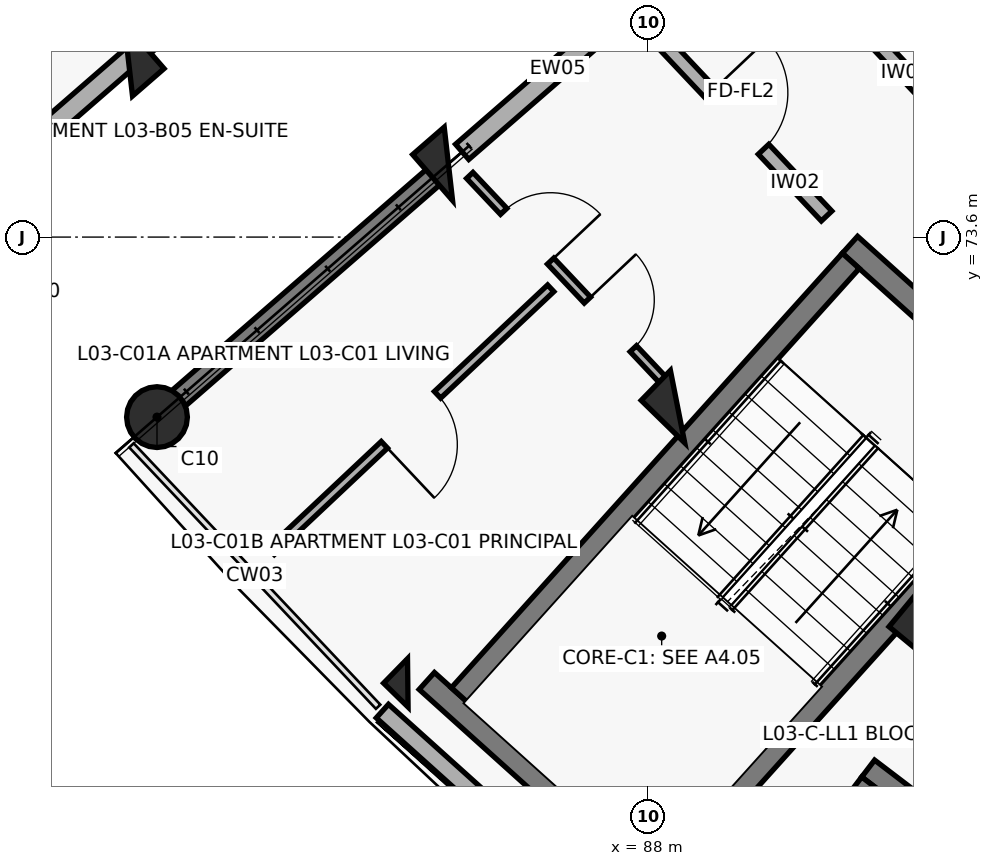
"""IFC4 building model, lengths in metres.
Left out: names, types, materials, properties, quantities, classifications, styles, units other than length and angle.
Written with IfcOpenShell. Run it as: python <this file> out.ifc"""

import sys

from ifc_helpers import new_model, si_unit, direction, frame, frame_2d, origin, origin_2d, place, context, subcontext, project, spatial, rectangle, circle, extrude, element, fill, save


model = new_model("IFC4")
c1 = context("Model", 3, precision=1e-05, world=origin(), true_north=direction((0.0, 1.0)))
c2 = subcontext(c1, "Body", "Model", "MODEL_VIEW")
j1 = project(units=[si_unit("LENGTHUNIT", "METRE"), si_unit("PLANEANGLEUNIT", "RADIAN")], contexts=[c1])
p1 = place(None, origin())
s1 = spatial("IfcSite", under=j1, at=p1, CompositionType="ELEMENT")
p2 = place(p1, origin())
s2 = spatial("IfcBuilding", under=s1, at=p2, CompositionType="ELEMENT")
p3 = place(p2, frame((0.0, 0.0, 11.2)))
s3 = spatial("IfcBuildingStorey", under=s2, at=p3, CompositionType="ELEMENT", Elevation=11.2)
for number, where, z_axis, x_axis in (
    (1, (81.166, 75.938, 0.0), (0.0, 0.0, 1.0), (0.755, 0.656, 0.0)),
    (2, (85.377, 74.564, 0.0), (0.0, 0.0, 1.0), (-0.755, -0.656, 0.0)),
):
    element("IfcColumn", number, at=place(p3, frame(where, z_axis=z_axis, x_axis=x_axis)), inside=s3, PredefinedType="COLUMN", context=c2, shape_type="SweptSolid", body=[
        extrude(rectangle(XDim=0.55, YDim=0.8, at=origin_2d()), origin(), (0.0, 0.0, 1.0), 3.1),
    ])
p4 = place(p3, frame((81.543, 71.231, 0.0), z_axis=(0.0, 0.0, 1.0), x_axis=(-0.754709580223, -0.656059028991, 0.0)))
e3 = element("IfcColumn", 3, at=p4, inside=s3, PredefinedType="COLUMN", context=c2, shape_type="SweptSolid", body=[
    extrude(circle(Radius=0.4, at=origin_2d()), origin(), (0.0, 0.0, 1.0), 3.1),
])
p5 = place(p3, frame((88.392, 71.369, 0.0), z_axis=(0.0, 0.0, 1.0), x_axis=(-0.698665066769, -0.715448897181, 0.0)))
e4 = element("IfcColumn", 4, at=p5, inside=s3, PredefinedType="COLUMN", context=c2, shape_type="SweptSolid", body=[
    extrude(rectangle(XDim=0.55, YDim=0.8, at=origin_2d()), origin(), (0.0, 0.0, 1.0), 3.1),
])
p6 = place(p3, frame((84.843, 67.734, 0.0), z_axis=(0.0, 0.0, 1.0), x_axis=(-0.698665066769, -0.715448897181, 0.0)))
e5 = element("IfcColumn", 5, at=p6, inside=s3, PredefinedType="COLUMN", context=c2, shape_type="SweptSolid", body=[
    extrude(rectangle(XDim=0.45, YDim=0.45, at=origin_2d()), origin(), (0.0, 0.0, 1.0), 3.1),
])
p7 = place(p3, frame((91.658, 68.43, 0.0), z_axis=(0.0, 0.0, 1.0), x_axis=(-0.637961754089, -0.770068049148, 0.0)))
e6 = element("IfcColumn", 6, at=p7, inside=s3, PredefinedType="COLUMN", context=c2, shape_type="SweptSolid", body=[
    extrude(rectangle(XDim=0.55, YDim=0.8, at=origin_2d()), origin(), (0.0, 0.0, 1.0), 3.1),
])
p8 = place(p3, frame((85.241, 74.446, 0.0), z_axis=(0.0, 0.0, 1.0), x_axis=(-0.754703505217, -0.65606601742, 0.0)))
e7 = element("IfcWall", 7, at=p8, inside=s3, PredefinedType="SHEAR", context=c2, shape_type="SweptSolid", body=[
    extrude(rectangle(XDim=4.72, YDim=0.27, at=frame_2d((2.36, 0.0))), origin(), (0.0, 0.0, 1.0), 2.86),
])
p9 = place(p3, frame((79.234, 74.259, 0.0), z_axis=(0.0, 0.0, 1.0), x_axis=(0.754717680958, 0.656049710044, 0.0)))
e8 = element("IfcWall", 8, at=p9, inside=s3, PredefinedType="SOLIDWALL", context=c2, shape_type="SweptSolid", body=[
    extrude(rectangle(XDim=8.2, YDim=0.265, at=frame_2d((4.1, 0.0))), origin(), (0.0, 0.0, 1.0), 2.08),
])
p10 = place(p9, frame((3.59, 0.0, 0.75)))
e9 = element("IfcOpeningElement", 9, at=p10, cuts=e8, PredefinedType="OPENING", context=c2, shape_type="SweptSolid", body=[
    extrude(rectangle(XDim=1.35, YDim=1.35, at=frame_2d((0.675, 0.675))), frame((0.0, 0.142, 0.0), z_axis=(0.0, -1.0, 0.0), x_axis=(1.0, 0.0, 0.0)), (0.0, 0.0, 1.0), 0.285),
])
p11 = place(p3, frame((84.508, 67.363, 0.0), z_axis=(0.0, 0.0, 1.0), x_axis=(0.743387539862, -0.668860946369, 0.0)))
e10 = element("IfcWall", 10, at=p11, inside=s3, PredefinedType="SOLIDWALL", context=c2, shape_type="SweptSolid", body=[
    extrude(rectangle(XDim=4.809, YDim=0.24, at=frame_2d((2.405, 0.0))), origin(), (0.0, 0.0, 1.0), 2.25),
])
p12 = place(p3, frame((91.746, 80.101, 0.0), z_axis=(0.0, 0.0, 1.0), x_axis=(-0.754704866158, -0.656064451862, 0.0)))
e11 = element("IfcWall", 11, at=p12, inside=s3, PredefinedType="SOLIDWALL", context=c2, shape_type="SweptSolid", body=[
    extrude(rectangle(XDim=8.2, YDim=0.265, at=frame_2d((4.1, 0.0))), origin(), (0.0, 0.0, 1.0), 2.08),
])
p13 = place(p12, frame((3.59, 0.0, 0.75)))
e12 = element("IfcOpeningElement", 12, at=p13, cuts=e11, PredefinedType="OPENING", context=c2, shape_type="SweptSolid", body=[
    extrude(rectangle(XDim=1.35, YDim=1.35, at=frame_2d((0.675, 0.675))), frame((0.0, 0.142, 0.0), z_axis=(0.0, -1.0, 0.0), x_axis=(1.0, 0.0, 0.0)), (0.0, 0.0, 1.0), 0.285),
])
p14 = place(p3, frame((90.66, 73.499, 0.0), z_axis=(0.0, 0.0, 1.0), x_axis=(0.743375696158, -0.668874109501, 0.0)))
e13 = element("IfcWall", 13, at=p14, inside=s3, PredefinedType="SHEAR", context=c2, shape_type="SweptSolid", body=[
    extrude(rectangle(XDim=3.87, YDim=0.3, at=frame_2d((1.935, 0.0))), origin(), (0.0, 0.0, 1.0), 3.1),
])
p15 = place(p14, frame((1.435, 0.0, 0.0)))
e14 = element("IfcOpeningElement", 14, at=p15, cuts=e13, PredefinedType="OPENING", context=c2, shape_type="SweptSolid", body=[
    extrude(rectangle(XDim=1.0, YDim=2.15, at=frame_2d((0.5, 1.075))), frame((0.0, 0.16, 0.0), z_axis=(0.0, -1.0, 0.0), x_axis=(1.0, 0.0, 0.0)), (0.0, 0.0, 1.0), 0.32),
])
p16 = place(p3, frame((85.093, 67.76, 0.0), z_axis=(0.0, 0.0, 1.0), x_axis=(0.743372896184, -0.668877221333, 0.0)))
e15 = element("IfcWall", 15, at=p16, inside=s3, PredefinedType="SHEAR", context=c2, shape_type="SweptSolid", body=[
    extrude(rectangle(XDim=4.47, YDim=0.3, at=frame_2d((2.235, 0.0))), origin(), (0.0, 0.0, 1.0), 3.1),
])
p17 = place(p3, frame((90.671, 73.287, 0.0), z_axis=(0.0, 0.0, 1.0), x_axis=(-0.668885797871, -0.743365179038, 0.0)))
e16 = element("IfcWall", 16, at=p17, inside=s3, PredefinedType="SHEAR", context=c2, shape_type="SweptSolid", body=[
    extrude(rectangle(XDim=7.69, YDim=0.3, at=frame_2d((3.845, 0.0))), origin(), (0.0, 0.0, 1.0), 3.1),
])
p18 = place(p3, frame((93.325, 70.899, 0.0), z_axis=(0.0, 0.0, 1.0), x_axis=(-0.668868253964, -0.743380964808, 0.0)))
e17 = element("IfcWall", 17, at=p18, inside=s3, PredefinedType="SHEAR", context=c2, shape_type="SweptSolid", body=[
    extrude(rectangle(XDim=7.69, YDim=0.3, at=frame_2d((3.845, 0.0))), origin(), (0.0, 0.0, 1.0), 3.1),
])
p19 = place(p3, frame((90.899, 66.607, 0.0), z_axis=(0.0, 0.0, 1.0), x_axis=(0.795439986025, -0.606032365994, 0.0)))
e18 = element("IfcWall", 18, at=p19, inside=s3, PredefinedType="SHEAR", context=c2, shape_type="SweptSolid", body=[
    extrude(rectangle(XDim=3.39, YDim=0.28, at=frame_2d((1.695, 0.0))), origin(), (0.0, 0.0, 1.0), 3.1),
])
p20 = place(p19, frame((1.095, 0.0, 0.0)))
e19 = element("IfcOpeningElement", 19, at=p20, cuts=e18, PredefinedType="OPENING", context=c2, shape_type="SweptSolid", body=[
    extrude(rectangle(XDim=1.2, YDim=2.15, at=frame_2d((0.6, 1.075))), frame((0.0, 0.15, 0.0), z_axis=(0.0, -1.0, 0.0), x_axis=(1.0, 0.0, 0.0)), (0.0, 0.0, 1.0), 0.3),
])
p21 = place(p3, frame((90.926, 66.411, 0.0), z_axis=(0.0, 0.0, 1.0), x_axis=(-0.605948992168, -0.795503500238, 0.0)))
e20 = element("IfcWall", 20, at=p21, inside=s3, PredefinedType="SHEAR", context=c2, shape_type="SweptSolid", body=[
    extrude(rectangle(XDim=2.03, YDim=0.28, at=frame_2d((1.015, 0.0))), origin(), (0.0, 0.0, 1.0), 3.1),
])
p22 = place(p3, frame((78.163, 75.139, 0.0), z_axis=(0.0, 0.0, 1.0), x_axis=(0.734519733107, 0.678587327967, 0.0)))
e21 = element("IfcWall", 21, at=p22, inside=s3, PredefinedType="PARTITIONING", context=c2, shape_type="SweptSolid", body=[
    extrude(rectangle(XDim=3.3, YDim=0.145, at=frame_2d((1.65, 0.0))), origin(), (0.0, 0.0, 1.0), 2.08),
])
p23 = place(p22, frame((1.21, 0.0, 0.0)))
e22 = element("IfcOpeningElement", 22, at=p23, cuts=e21, PredefinedType="OPENING", context=c2, shape_type="SweptSolid", body=[
    extrude(rectangle(XDim=0.88, YDim=2.1, at=frame_2d((0.44, 1.05))), frame((0.0, 0.083, 0.0), z_axis=(0.0, -1.0, 0.0), x_axis=(1.0, 0.0, 0.0)), (0.0, 0.0, 1.0), 0.165),
])
p24 = place(p3, frame((87.994, 76.376, 0.0), z_axis=(0.0, 0.0, 1.0), x_axis=(0.686310507227, -0.727308660522, 0.0)))
e23 = element("IfcWall", 23, at=p24, inside=s3, PredefinedType="SOLIDWALL", context=c2, shape_type="SweptSolid", body=[
    extrude(rectangle(XDim=3.436, YDim=0.19, at=frame_2d((1.718, 0.0))), origin(), (0.0, 0.0, 1.0), 2.08),
])
p25 = place(p24, frame((1.208, 0.0, 0.0)))
e24 = element("IfcOpeningElement", 24, at=p25, cuts=e23, PredefinedType="OPENING", context=c2, shape_type="SweptSolid", body=[
    extrude(rectangle(XDim=1.02, YDim=2.15, at=frame_2d((0.51, 1.075))), frame((0.0, 0.105, 0.0), z_axis=(0.0, -1.0, 0.0), x_axis=(1.0, 0.0, 0.0)), (0.0, 0.0, 1.0), 0.21),
])
p26 = place(p3, frame((89.541, 77.721, 0.0), z_axis=(0.0, 0.0, 1.0), x_axis=(0.686344941052, -0.727276166179, 0.0)))
e25 = element("IfcWall", 25, at=p26, inside=s3, PredefinedType="SOLIDWALL", context=c2, shape_type="SweptSolid", body=[
    extrude(rectangle(XDim=3.269, YDim=0.19, at=frame_2d((1.634, 0.0))), origin(), (0.0, 0.0, 1.0), 2.08),
])
p27 = place(p26, frame((1.154, 0.0, 0.0)))
e26 = element("IfcOpeningElement", 26, at=p27, cuts=e25, PredefinedType="OPENING", context=c2, shape_type="SweptSolid", body=[
    extrude(rectangle(XDim=0.96, YDim=2.1, at=frame_2d((0.48, 1.05))), frame((0.0, 0.105, 0.0), z_axis=(0.0, -1.0, 0.0), x_axis=(1.0, 0.0, 0.0)), (0.0, 0.0, 1.0), 0.21),
])
p28 = place(p3, frame((85.658, 74.411, 0.0), z_axis=(0.0, 0.0, 1.0), x_axis=(0.686364008772, -0.727258171121, 0.0)))
e27 = element("IfcWall", 27, at=p28, inside=s3, PredefinedType="PARTITIONING", context=c2, shape_type="SweptSolid", body=[
    extrude(rectangle(XDim=3.785, YDim=0.115, at=frame_2d((1.893, 0.0))), origin(), (0.0, 0.0, 1.0), 2.08),
])
p29 = place(p28, frame((0.65, 0.0, 0.0)))
e28 = element("IfcOpeningElement", 28, at=p29, cuts=e27, PredefinedType="OPENING", context=c2, shape_type="SweptSolid", body=[
    extrude(rectangle(XDim=0.9, YDim=2.1, at=frame_2d((0.45, 1.05))), frame((0.0, 0.067, 0.0), z_axis=(0.0, -1.0, 0.0), x_axis=(1.0, 0.0, 0.0)), (0.0, 0.0, 1.0), 0.135),
])
p30 = place(p28, frame((2.255, 0.0, 0.0)))
e29 = element("IfcOpeningElement", 29, at=p30, cuts=e27, PredefinedType="OPENING", context=c2, shape_type="SweptSolid", body=[
    extrude(rectangle(XDim=0.88, YDim=2.1, at=frame_2d((0.44, 1.05))), frame((0.0, 0.067, 0.0), z_axis=(0.0, -1.0, 0.0), x_axis=(1.0, 0.0, 0.0)), (0.0, 0.0, 1.0), 0.135),
])
p31 = place(p3, frame((86.723, 72.926, 0.0), z_axis=(0.0, 0.0, 1.0), x_axis=(-0.72831636485, -0.685241032551, 0.0)))
e30 = element("IfcWall", 30, at=p31, inside=s3, PredefinedType="PARTITIONING", context=c2, shape_type="SweptSolid", body=[
    extrude(rectangle(XDim=5.05, YDim=0.12, at=frame_2d((2.525, 0.0))), origin(), (0.0, 0.0, 1.0), 2.08),
])
p32 = place(p31, frame((2.045, 0.0, 0.0)))
e31 = element("IfcOpeningElement", 31, at=p32, cuts=e30, PredefinedType="OPENING", context=c2, shape_type="SweptSolid", body=[
    extrude(rectangle(XDim=0.96, YDim=2.1, at=frame_2d((0.48, 1.05))), frame((0.0, 0.07, 0.0), z_axis=(0.0, -1.0, 0.0), x_axis=(1.0, 0.0, 0.0)), (0.0, 0.0, 1.0), 0.14),
])
p33 = place(p25, origin())
e32 = element("IfcDoor", 32, at=p33, inside=s3, OperationType="SINGLE_SWING_LEFT", PredefinedType="DOOR", context=c2, shape_type="SweptSolid", body=[
    extrude(rectangle(XDim=1.02, YDim=2.15, at=frame_2d((0.51, 1.075))), frame((0.0, 0.025, 0.0), z_axis=(0.0, -1.0, 0.0), x_axis=(1.0, 0.0, 0.0)), (0.0, 0.0, 1.0), 0.05),
])
fill(e24, e32)
p34 = place(p29, origin())
e33 = element("IfcDoor", 33, at=p34, inside=s3, OperationType="SINGLE_SWING_RIGHT", PredefinedType="DOOR", context=c2, shape_type="SweptSolid", body=[
    extrude(rectangle(XDim=0.9, YDim=2.1, at=frame_2d((0.45, 1.05))), frame((0.0, 0.025, 0.0), z_axis=(0.0, -1.0, 0.0), x_axis=(1.0, 0.0, 0.0)), (0.0, 0.0, 1.0), 0.05),
])
fill(e28, e33)
p35 = place(p30, origin())
e34 = element("IfcDoor", 34, at=p35, inside=s3, OperationType="SINGLE_SWING_LEFT", PredefinedType="DOOR", context=c2, shape_type="SweptSolid", body=[
    extrude(rectangle(XDim=0.88, YDim=2.1, at=frame_2d((0.44, 1.05))), frame((0.0, 0.025, 0.0), z_axis=(0.0, -1.0, 0.0), x_axis=(1.0, 0.0, 0.0)), (0.0, 0.0, 1.0), 0.05),
])
fill(e29, e34)
p36 = place(p32, origin())
e35 = element("IfcDoor", 35, at=p36, inside=s3, OperationType="SINGLE_SWING_RIGHT", PredefinedType="DOOR", context=c2, shape_type="SweptSolid", body=[
    extrude(rectangle(XDim=0.96, YDim=2.1, at=frame_2d((0.48, 1.05))), frame((0.0, 0.025, 0.0), z_axis=(0.0, -1.0, 0.0), x_axis=(1.0, 0.0, 0.0)), (0.0, 0.0, 1.0), 0.05),
])
fill(e31, e35)
save(model, sys.argv[1])
